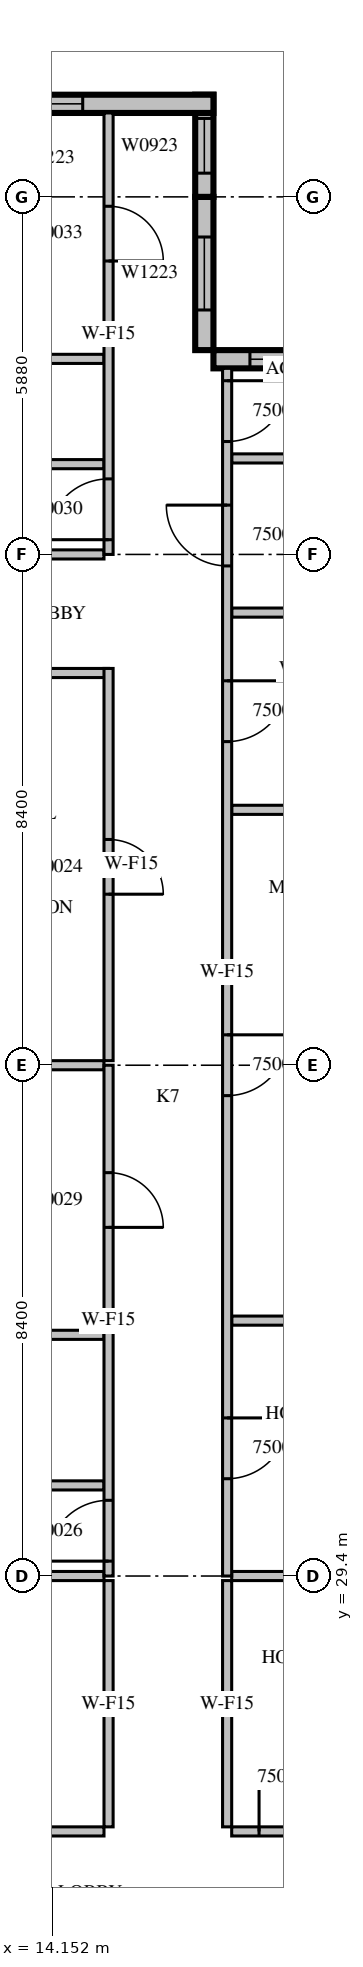
"""IFC4 building model, lengths in metres.
Left out: names, types, materials, properties, quantities, classifications, styles, units other than length and angle.
Written with IfcOpenShell. Run it as: python <this file> out.ifc"""

import sys

from ifc_helpers import new_model, si_unit, direction, frame, frame_2d, origin, place, context, subcontext, project, spatial, rectangle, extrude, source, transform, mapped, element, fill, save


model = new_model("IFC4")
c1 = context("Model", 3, precision=1e-05, world=origin(), true_north=direction((0.0, 1.0)))
c2 = subcontext(c1, "Body", "Model", "MODEL_VIEW")
j1 = project(units=[si_unit("LENGTHUNIT", "METRE"), si_unit("PLANEANGLEUNIT", "RADIAN")], contexts=[c1])
p1 = place(None, origin())
s1 = spatial("IfcSite", under=j1, at=p1, CompositionType="ELEMENT")
p2 = place(p1, origin())
s2 = spatial("IfcBuilding", under=s1, at=p2, CompositionType="ELEMENT")
p3 = place(p2, frame((0.0, 0.0, 223.4)))
s3 = spatial("IfcBuildingStorey", under=s2, at=p3, CompositionType="ELEMENT", Elevation=223.4)
m1 = source(origin(), c2, "Body", "SweptSolid", [
    extrude(rectangle(XDim=4.2, YDim=0.3, at=frame_2d((2.1, 0.0))), origin(), (0.0, 0.0, 1.0), 3.4),
])
p4 = place(p3, frame((21.0, 49.41, 0.0), z_axis=(0.0, 0.0, 1.0), x_axis=(-1.0, 0.0, 0.0)))
e1 = element("IfcWall", 1, at=p4, inside=s3, PredefinedType="STANDARD", context=c2, shape_type="MappedRepresentation", body=[
    mapped(m1, transform((0.0, 0.0, 0.0), scale=1.0)),
])
m2 = source(origin(), c2, "Body", "SweptSolid", [
    extrude(rectangle(XDim=3.0, YDim=2.3, at=frame_2d((1.5, 1.15))), frame((0.0, 0.16, 0.0), z_axis=(0.0, -1.0, 0.0), x_axis=(1.0, 0.0, 0.0)), (0.0, 0.0, 1.0), 0.32),
])
p5 = place(p4, frame((0.6, 0.0, 0.6)))
e2 = element("IfcOpeningElement", 2, at=p5, cuts=e1, PredefinedType="OPENING", context=c2, shape_type="MappedRepresentation", body=[
    mapped(m2, transform((0.0, 0.0, 0.0), scale=1.0)),
])
m3 = source(origin(), c2, "Body", "SweptSolid", [
    extrude(rectangle(XDim=2.52, YDim=0.3, at=frame_2d((1.26, 0.0))), origin(), (0.0, 0.0, 1.0), 3.4),
])
p6 = place(p3, frame((16.65, 49.56, 0.0), z_axis=(0.0, 0.0, 1.0), x_axis=(0.0, 1.0, 0.0)))
e3 = element("IfcWall", 3, at=p6, inside=s3, PredefinedType="STANDARD", context=c2, shape_type="MappedRepresentation", body=[
    mapped(m3, transform((0.0, 0.0, 0.0), scale=1.0)),
])
m4 = source(origin(), c2, "Body", "SweptSolid", [
    extrude(rectangle(XDim=1.2, YDim=2.3, at=frame_2d((0.6, 1.15))), frame((0.0, 0.16, 0.0), z_axis=(0.0, -1.0, 0.0), x_axis=(1.0, 0.0, 0.0)), (0.0, 0.0, 1.0), 0.32),
])
p7 = place(p6, frame((0.66, 0.0, 0.6)))
e4 = element("IfcOpeningElement", 4, at=p7, cuts=e3, PredefinedType="OPENING", context=c2, shape_type="MappedRepresentation", body=[
    mapped(m4, transform((0.0, 0.0, 0.0), scale=1.0)),
])
m5 = source(origin(), c2, "Body", "SweptSolid", [
    extrude(rectangle(XDim=1.68, YDim=0.3, at=frame_2d((0.84, 0.0))), origin(), (0.0, 0.0, 1.0), 3.4),
])
p8 = place(p3, frame((16.65, 52.08, 0.0), z_axis=(0.0, 0.0, 1.0), x_axis=(0.0, 1.0, 0.0)))
e5 = element("IfcWall", 5, at=p8, inside=s3, PredefinedType="STANDARD", context=c2, shape_type="MappedRepresentation", body=[
    mapped(m5, transform((0.0, 0.0, 0.0), scale=1.0)),
])
m6 = source(origin(), c2, "Body", "SweptSolid", [
    extrude(rectangle(XDim=0.9, YDim=2.3, at=frame_2d((0.45, 1.15))), frame((0.0, 0.16, 0.0), z_axis=(0.0, -1.0, 0.0), x_axis=(1.0, 0.0, 0.0)), (0.0, 0.0, 1.0), 0.32),
])
p9 = place(p8, frame((0.39, 0.0, 0.6)))
e6 = element("IfcOpeningElement", 6, at=p9, cuts=e5, PredefinedType="OPENING", context=c2, shape_type="MappedRepresentation", body=[
    mapped(m6, transform((0.0, 0.0, 0.0), scale=1.0)),
])
m7 = source(origin(), c2, "Body", "SweptSolid", [
    extrude(rectangle(XDim=10.5, YDim=0.3, at=frame_2d((5.25, 0.0))), origin(), (0.0, 0.0, 1.0), 3.4),
])
p10 = place(p3, frame((16.8, 53.61, 0.0), z_axis=(0.0, 0.0, 1.0), x_axis=(-1.0, 0.0, 0.0)))
e7 = element("IfcWall", 7, at=p10, inside=s3, PredefinedType="STANDARD", context=c2, shape_type="MappedRepresentation", body=[
    mapped(m7, transform((0.0, 0.0, 0.0), scale=1.0)),
])
p11 = place(p10, frame((2.15, 0.0, 0.6)))
e8 = element("IfcOpeningElement", 8, at=p11, cuts=e7, PredefinedType="OPENING", context=c2, shape_type="MappedRepresentation", body=[
    mapped(m4, transform((0.0, 0.0, 0.0), scale=1.0)),
])
m8 = source(origin(), c2, "Body", "SweptSolid", [
    extrude(rectangle(XDim=1.8, YDim=2.3, at=frame_2d((0.9, 1.15))), frame((0.0, 0.16, 0.0), z_axis=(0.0, -1.0, 0.0), x_axis=(1.0, 0.0, 0.0)), (0.0, 0.0, 1.0), 0.32),
])
p12 = place(p10, frame((8.025, 0.0, 0.6)))
e9 = element("IfcOpeningElement", 9, at=p12, cuts=e7, PredefinedType="OPENING", context=c2, shape_type="MappedRepresentation", body=[
    mapped(m8, transform((0.0, 0.0, 0.0), scale=1.0)),
])
m9 = source(origin(), c2, "Body", "SweptSolid", [
    extrude(rectangle(XDim=8.495, YDim=0.15, at=frame_2d((4.247, 0.0))), origin(), (0.0, 0.0, 1.0), 3.4),
])
p13 = place(p3, frame((6.505, 25.2, 0.0), z_axis=(0.0, 0.0, 1.0), x_axis=(1.0, 0.0, 0.0)))
e10 = element("IfcWall", 10, at=p13, inside=s3, PredefinedType="PARTITIONING", context=c2, shape_type="MappedRepresentation", body=[
    mapped(m9, transform((0.0, 0.0, 0.0), scale=1.0)),
])
m10 = source(origin(), c2, "Body", "SweptSolid", [
    extrude(rectangle(XDim=0.9, YDim=2.1, at=frame_2d((0.45, 1.05))), frame((0.0, 0.085, 0.0), z_axis=(0.0, -1.0, 0.0), x_axis=(1.0, 0.0, 0.0)), (0.0, 0.0, 1.0), 0.17),
])
p14 = place(p13, frame((0.695, 0.0, 0.0)))
e11 = element("IfcOpeningElement", 11, at=p14, cuts=e10, PredefinedType="OPENING", context=c2, shape_type="MappedRepresentation", body=[
    mapped(m10, transform((0.0, 0.0, 0.0), scale=1.0)),
])
p15 = place(p13, frame((5.77, 0.0, 0.0)))
e12 = element("IfcOpeningElement", 12, at=p15, cuts=e10, PredefinedType="OPENING", context=c2, shape_type="MappedRepresentation", body=[
    mapped(m10, transform((0.0, 0.0, 0.0), scale=1.0)),
])
m11 = source(origin(), c2, "Body", "SweptSolid", [
    extrude(rectangle(XDim=3.6, YDim=0.15, at=frame_2d((1.8, 0.0))), origin(), (0.0, 0.0, 1.0), 3.4),
])
p16 = place(p3, frame((17.1, 25.2, 0.0), z_axis=(0.0, 0.0, 1.0), x_axis=(1.0, 0.0, 0.0)))
e13 = element("IfcWall", 13, at=p16, inside=s3, PredefinedType="PARTITIONING", context=c2, shape_type="MappedRepresentation", body=[
    mapped(m11, transform((0.0, 0.0, 0.0), scale=1.0)),
])
p17 = place(p16, frame((0.45, 0.0, 0.0)))
e14 = element("IfcOpeningElement", 14, at=p17, cuts=e13, PredefinedType="OPENING", context=c2, shape_type="MappedRepresentation", body=[
    mapped(m10, transform((0.0, 0.0, 0.0), scale=1.0)),
])
m12 = source(origin(), c2, "Body", "SweptSolid", [
    extrude(rectangle(XDim=4.05, YDim=0.15, at=frame_2d((2.025, 0.0))), origin(), (0.0, 0.0, 1.0), 3.4),
])
for number, where, z_axis, x_axis in (
    (15, (15.075, 25.275, 0.0), (0.0, 0.0, 1.0), (0.0, 1.0, 0.0)),
    (16, (17.025, 29.325, 0.0), (0.0, 0.0, 1.0), (0.0, -1.0, 0.0)),
):
    element("IfcWall", number, at=place(p3, frame(where, z_axis=z_axis, x_axis=x_axis)), inside=s3, PredefinedType="PARTITIONING", context=c2, shape_type="MappedRepresentation", body=[
        mapped(m12, transform((0.0, 0.0, 0.0), scale=1.0)),
    ])
m13 = source(origin(), c2, "Body", "SweptSolid", [
    extrude(rectangle(XDim=4.051, YDim=0.15, at=frame_2d((2.026, 0.0))), origin(), (0.0, 0.0, 1.0), 3.4),
])
p18 = place(p3, frame((15.0, 29.4, 0.0), z_axis=(0.0, 0.0, 1.0), x_axis=(-1.0, 0.0, 0.0)))
e17 = element("IfcWall", 17, at=p18, inside=s3, PredefinedType="PARTITIONING", context=c2, shape_type="MappedRepresentation", body=[
    mapped(m13, transform((0.0, 0.0, 0.0), scale=1.0)),
])
m14 = source(origin(), c2, "Body", "SweptSolid", [
    extrude(rectangle(XDim=3.001, YDim=0.15, at=frame_2d((1.5, 0.0))), origin(), (0.0, 0.0, 1.0), 3.4),
])
p19 = place(p3, frame((20.101, 29.4, 0.0), z_axis=(0.0, 0.0, 1.0), x_axis=(-1.0, 0.0, 0.0)))
e18 = element("IfcWall", 18, at=p19, inside=s3, PredefinedType="PARTITIONING", context=c2, shape_type="MappedRepresentation", body=[
    mapped(m14, transform((0.0, 0.0, 0.0), scale=1.0)),
])
m15 = source(origin(), c2, "Body", "SweptSolid", [
    extrude(rectangle(XDim=2.775, YDim=0.15, at=frame_2d((1.387, 0.0))), origin(), (0.0, 0.0, 1.0), 3.4),
])
p20 = place(p3, frame((15.075, 44.25, 0.0), z_axis=(0.0, 0.0, 1.0), x_axis=(-1.0, 0.0, 0.0)))
e19 = element("IfcWall", 19, at=p20, inside=s3, PredefinedType="PARTITIONING", context=c2, shape_type="MappedRepresentation", body=[
    mapped(m15, transform((0.0, 0.0, 0.0), scale=1.0)),
])
m16 = source(origin(), c2, "Body", "SweptSolid", [
    extrude(rectangle(XDim=6.45, YDim=0.15, at=frame_2d((3.225, 0.0))), origin(), (0.0, 0.0, 1.0), 3.4),
])
p21 = place(p3, frame((15.075, 37.875, 0.0), z_axis=(0.0, 0.0, 1.0), x_axis=(0.0, 1.0, 0.0)))
e20 = element("IfcWall", 20, at=p21, inside=s3, PredefinedType="PARTITIONING", context=c2, shape_type="MappedRepresentation", body=[
    mapped(m16, transform((0.0, 0.0, 0.0), scale=1.0)),
])
p22 = place(p21, frame((2.737, 0.0, 0.0)))
e21 = element("IfcOpeningElement", 21, at=p22, cuts=e20, PredefinedType="OPENING", context=c2, shape_type="MappedRepresentation", body=[
    mapped(m10, transform((0.0, 0.0, 0.0), scale=1.0)),
])
m17 = source(origin(), c2, "Body", "SweptSolid", [
    extrude(rectangle(XDim=3.9, YDim=0.15, at=frame_2d((1.95, 0.0))), origin(), (0.0, 0.0, 1.0), 3.4),
])
for number, where, z_axis, x_axis in (
    (22, (15.0, 30.89, 0.0), (0.0, 0.0, 1.0), (-1.0, 0.0, 0.0)),
    (23, (15.0, 33.367, 0.0), (0.0, 0.0, 1.0), (-1.0, 0.0, 0.0)),
    (24, (15.0, 37.8, 0.0), (0.0, 0.0, 1.0), (-1.0, 0.0, 0.0)),
    (25, (15.0, 47.684, 0.0), (0.0, 0.0, 1.0), (-1.0, 0.0, 0.0)),
    (26, (15.0, 49.416, 0.0), (0.0, 0.0, 1.0), (-1.0, 0.0, 0.0)),
    (27, (15.0, 46.2, 0.0), (0.0, 0.0, 1.0), (-1.0, 0.0, 0.0)),
):
    element("IfcWall", number, at=place(p3, frame(where, z_axis=z_axis, x_axis=x_axis)), inside=s3, PredefinedType="PARTITIONING", context=c2, shape_type="MappedRepresentation", body=[
        mapped(m17, transform((0.0, 0.0, 0.0), scale=1.0)),
    ])
for number, where, z_axis, x_axis in (
    (28, (17.1, 45.244, 0.0), (0.0, 0.0, 1.0), (1.0, 0.0, 0.0)),
    (29, (17.1, 47.779, 0.0), (0.0, 0.0, 1.0), (1.0, 0.0, 0.0)),
    (30, (20.7, 33.6, 0.0), (0.0, 0.0, 1.0), (-1.0, 0.0, 0.0)),
    (31, (20.7, 42.0, 0.0), (0.0, 0.0, 1.0), (-1.0, 0.0, 0.0)),
):
    element("IfcWall", number, at=place(p3, frame(where, z_axis=z_axis, x_axis=x_axis)), inside=s3, PredefinedType="PARTITIONING", context=c2, shape_type="MappedRepresentation", body=[
        mapped(m11, transform((0.0, 0.0, 0.0), scale=1.0)),
    ])
m18 = source(origin(), c2, "Body", "SweptSolid", [
    extrude(rectangle(XDim=8.4, YDim=0.15, at=frame_2d((4.2, 0.0))), origin(), (0.0, 0.0, 1.0), 3.4),
])
p23 = place(p3, frame((15.075, 29.4, 0.0), z_axis=(0.0, 0.0, 1.0), x_axis=(0.0, 1.0, 0.0)))
e32 = element("IfcWall", 32, at=p23, inside=s3, PredefinedType="PARTITIONING", context=c2, shape_type="MappedRepresentation", body=[
    mapped(m18, transform((0.0, 0.0, 0.0), scale=1.0)),
])
m19 = source(origin(), c2, "Body", "SweptSolid", [
    extrude(rectangle(XDim=1.0, YDim=2.1, at=frame_2d((0.5, 1.05))), frame((0.0, 0.085, 0.0), z_axis=(0.0, -1.0, 0.0), x_axis=(1.0, 0.0, 0.0)), (0.0, 0.0, 1.0), 0.17),
])
p24 = place(p23, frame((0.245, 0.0, 0.0)))
e33 = element("IfcOpeningElement", 33, at=p24, cuts=e32, PredefinedType="OPENING", context=c2, shape_type="MappedRepresentation", body=[
    mapped(m19, transform((0.0, 0.0, 0.0), scale=1.0)),
])
p25 = place(p23, frame((5.733, 0.0, 0.0)))
e34 = element("IfcOpeningElement", 34, at=p25, cuts=e32, PredefinedType="OPENING", context=c2, shape_type="MappedRepresentation", body=[
    mapped(m10, transform((0.0, 0.0, 0.0), scale=1.0)),
])
m20 = source(origin(), c2, "Body", "SweptSolid", [
    extrude(rectangle(XDim=7.26, YDim=0.15, at=frame_2d((3.63, 0.0))), origin(), (0.0, 0.0, 1.0), 3.4),
])
p26 = place(p3, frame((15.075, 46.2, 0.0), z_axis=(0.0, 0.0, 1.0), x_axis=(0.0, 1.0, 0.0)))
e35 = element("IfcWall", 35, at=p26, inside=s3, PredefinedType="PARTITIONING", context=c2, shape_type="MappedRepresentation", body=[
    mapped(m20, transform((0.0, 0.0, 0.0), scale=1.0)),
])
p27 = place(p26, frame((0.242, 0.0, 0.0)))
e36 = element("IfcOpeningElement", 36, at=p27, cuts=e35, PredefinedType="OPENING", context=c2, shape_type="MappedRepresentation", body=[
    mapped(m19, transform((0.0, 0.0, 0.0), scale=1.0)),
])
p28 = place(p26, frame((4.825, 0.0, 0.0)))
e37 = element("IfcOpeningElement", 37, at=p28, cuts=e35, PredefinedType="OPENING", context=c2, shape_type="MappedRepresentation", body=[
    mapped(m10, transform((0.0, 0.0, 0.0), scale=1.0)),
])
m21 = source(origin(), c2, "Body", "SweptSolid", [
    extrude(rectangle(XDim=19.86, YDim=0.15, at=frame_2d((9.93, 0.0))), origin(), (0.0, 0.0, 1.0), 3.4),
])
p29 = place(p3, frame((17.025, 49.26, 0.0), z_axis=(0.0, 0.0, 1.0), x_axis=(0.0, -1.0, 0.0)))
e38 = element("IfcWall", 38, at=p29, inside=s3, PredefinedType="PARTITIONING", context=c2, shape_type="MappedRepresentation", body=[
    mapped(m21, transform((0.0, 0.0, 0.0), scale=1.0)),
])
p30 = place(p29, frame((17.26, 0.0, 0.0)))
e39 = element("IfcOpeningElement", 39, at=p30, cuts=e38, PredefinedType="OPENING", context=c2, shape_type="MappedRepresentation", body=[
    mapped(m19, transform((0.0, 0.0, 0.0), scale=1.0)),
])
p31 = place(p29, frame((10.96, 0.0, 0.0)))
e40 = element("IfcOpeningElement", 40, at=p31, cuts=e38, PredefinedType="OPENING", context=c2, shape_type="MappedRepresentation", body=[
    mapped(m19, transform((0.0, 0.0, 0.0), scale=1.0)),
])
p32 = place(p29, frame((5.138, 0.0, 0.0)))
e41 = element("IfcOpeningElement", 41, at=p32, cuts=e38, PredefinedType="OPENING", context=c2, shape_type="MappedRepresentation", body=[
    mapped(m19, transform((0.0, 0.0, 0.0), scale=1.0)),
])
p33 = place(p29, frame((2.249, 0.0, 0.0)))
e42 = element("IfcOpeningElement", 42, at=p33, cuts=e38, PredefinedType="OPENING", context=c2, shape_type="MappedRepresentation", body=[
    mapped(m19, transform((0.0, 0.0, 0.0), scale=1.0)),
])
p34 = place(p29, frame((0.203, 0.0, 0.0)))
e43 = element("IfcOpeningElement", 43, at=p34, cuts=e38, PredefinedType="OPENING", context=c2, shape_type="MappedRepresentation", body=[
    mapped(m19, transform((0.0, 0.0, 0.0), scale=1.0)),
])
m22 = source(origin(), c2, "Body", "SweptSolid", [
    extrude(rectangle(XDim=3.0, YDim=2.3, at=frame_2d((1.5, 1.15))), frame((0.0, 0.03, 0.0), z_axis=(0.0, -1.0, 0.0), x_axis=(1.0, 0.0, 0.0)), (0.0, 0.0, 1.0), 0.06),
])
p35 = place(p5, origin())
e44 = element("IfcWindow", 44, at=p35, inside=s3, PartitioningType="SINGLE_PANEL", PredefinedType="WINDOW", context=c2, shape_type="MappedRepresentation", body=[
    mapped(m22, transform((0.0, 0.0, 0.0), scale=1.0)),
])
fill(e2, e44)
m23 = source(origin(), c2, "Body", "SweptSolid", [
    extrude(rectangle(XDim=1.2, YDim=2.3, at=frame_2d((0.6, 1.15))), frame((0.0, 0.03, 0.0), z_axis=(0.0, -1.0, 0.0), x_axis=(1.0, 0.0, 0.0)), (0.0, 0.0, 1.0), 0.06),
])
p36 = place(p7, origin())
e45 = element("IfcWindow", 45, at=p36, inside=s3, PartitioningType="SINGLE_PANEL", PredefinedType="WINDOW", context=c2, shape_type="MappedRepresentation", body=[
    mapped(m23, transform((0.0, 0.0, 0.0), scale=1.0)),
])
fill(e4, e45)
m24 = source(origin(), c2, "Body", "SweptSolid", [
    extrude(rectangle(XDim=0.9, YDim=2.3, at=frame_2d((0.45, 1.15))), frame((0.0, 0.03, 0.0), z_axis=(0.0, -1.0, 0.0), x_axis=(1.0, 0.0, 0.0)), (0.0, 0.0, 1.0), 0.06),
])
p37 = place(p9, origin())
e46 = element("IfcWindow", 46, at=p37, inside=s3, PartitioningType="SINGLE_PANEL", PredefinedType="WINDOW", context=c2, shape_type="MappedRepresentation", body=[
    mapped(m24, transform((0.0, 0.0, 0.0), scale=1.0)),
])
fill(e6, e46)
p38 = place(p11, origin())
e47 = element("IfcWindow", 47, at=p38, inside=s3, PartitioningType="SINGLE_PANEL", PredefinedType="WINDOW", context=c2, shape_type="MappedRepresentation", body=[
    mapped(m23, transform((0.0, 0.0, 0.0), scale=1.0)),
])
fill(e8, e47)
m25 = source(origin(), c2, "Body", "SweptSolid", [
    extrude(rectangle(XDim=0.9, YDim=2.1, at=frame_2d((0.45, 1.05))), frame((0.0, 0.025, 0.0), z_axis=(0.0, -1.0, 0.0), x_axis=(1.0, 0.0, 0.0)), (0.0, 0.0, 1.0), 0.05),
])
p39 = place(p17, origin())
e48 = element("IfcDoor", 48, at=p39, inside=s3, OperationType="SINGLE_SWING_LEFT", PredefinedType="DOOR", context=c2, shape_type="MappedRepresentation", body=[
    mapped(m25, transform((0.0, 0.0, 0.0), scale=1.0)),
])
fill(e14, e48)
p40 = place(p22, origin())
e49 = element("IfcDoor", 49, at=p40, inside=s3, OperationType="SINGLE_SWING_RIGHT", PredefinedType="DOOR", context=c2, shape_type="MappedRepresentation", body=[
    mapped(m25, transform((0.0, 0.0, 0.0), scale=1.0)),
])
fill(e21, e49)
m26 = source(origin(), c2, "Body", "SweptSolid", [
    extrude(rectangle(XDim=1.0, YDim=2.1, at=frame_2d((0.5, 1.05))), frame((0.0, 0.025, 0.0), z_axis=(0.0, -1.0, 0.0), x_axis=(1.0, 0.0, 0.0)), (0.0, 0.0, 1.0), 0.05),
])
p41 = place(p24, origin())
e50 = element("IfcDoor", 50, at=p41, inside=s3, OperationType="SINGLE_SWING_LEFT", PredefinedType="DOOR", context=c2, shape_type="MappedRepresentation", body=[
    mapped(m26, transform((0.0, 0.0, 0.0), scale=1.0)),
])
fill(e33, e50)
p42 = place(p25, origin())
e51 = element("IfcDoor", 51, at=p42, inside=s3, OperationType="SINGLE_SWING_RIGHT", PredefinedType="DOOR", context=c2, shape_type="MappedRepresentation", body=[
    mapped(m25, transform((0.0, 0.0, 0.0), scale=1.0)),
])
fill(e34, e51)
p43 = place(p27, origin())
e52 = element("IfcDoor", 52, at=p43, inside=s3, OperationType="SINGLE_SWING_LEFT", PredefinedType="DOOR", context=c2, shape_type="MappedRepresentation", body=[
    mapped(m26, transform((0.0, 0.0, 0.0), scale=1.0)),
])
fill(e36, e52)
p44 = place(p28, origin())
e53 = element("IfcDoor", 53, at=p44, inside=s3, OperationType="SINGLE_SWING_RIGHT", PredefinedType="DOOR", context=c2, shape_type="MappedRepresentation", body=[
    mapped(m25, transform((0.0, 0.0, 0.0), scale=1.0)),
])
fill(e37, e53)
p45 = place(p30, origin())
e54 = element("IfcDoor", 54, at=p45, inside=s3, OperationType="SINGLE_SWING_LEFT", PredefinedType="DOOR", context=c2, shape_type="MappedRepresentation", body=[
    mapped(m26, transform((0.0, 0.0, 0.0), scale=1.0)),
])
fill(e39, e54)
p46 = place(p31, origin())
e55 = element("IfcDoor", 55, at=p46, inside=s3, OperationType="SINGLE_SWING_LEFT", PredefinedType="DOOR", context=c2, shape_type="MappedRepresentation", body=[
    mapped(m26, transform((0.0, 0.0, 0.0), scale=1.0)),
])
fill(e40, e55)
p47 = place(p32, origin())
e56 = element("IfcDoor", 56, at=p47, inside=s3, OperationType="SINGLE_SWING_LEFT", PredefinedType="DOOR", context=c2, shape_type="MappedRepresentation", body=[
    mapped(m26, transform((0.0, 0.0, 0.0), scale=1.0)),
])
fill(e41, e56)
p48 = place(p33, origin())
e57 = element("IfcDoor", 57, at=p48, inside=s3, OperationType="SINGLE_SWING_RIGHT", PredefinedType="DOOR", context=c2, shape_type="MappedRepresentation", body=[
    mapped(m26, transform((0.0, 0.0, 0.0), scale=1.0)),
])
fill(e42, e57)
p49 = place(p34, origin())
e58 = element("IfcDoor", 58, at=p49, inside=s3, OperationType="SINGLE_SWING_LEFT", PredefinedType="DOOR", context=c2, shape_type="MappedRepresentation", body=[
    mapped(m26, transform((0.0, 0.0, 0.0), scale=1.0)),
])
fill(e43, e58)
save(model, sys.argv[1])
